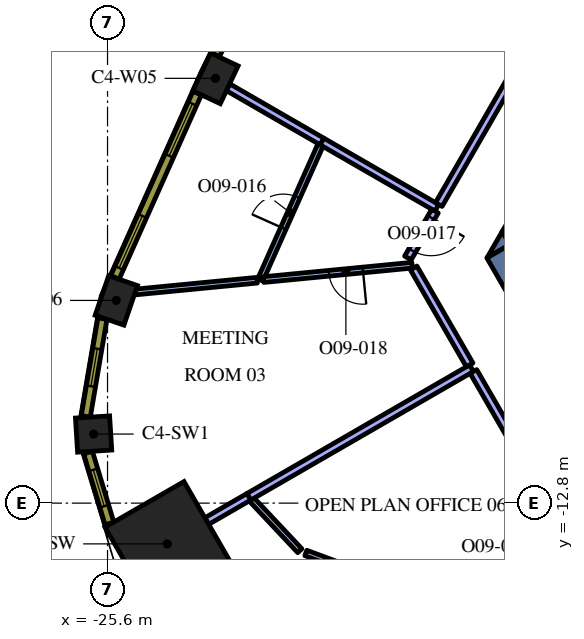
"""IFC4 building model, lengths in metres.
Left out: names, types, materials, properties, quantities, classifications, styles, units other than length and angle.
Written with IfcOpenShell. Run it as: python <this file> out.ifc"""

import sys

from ifc_helpers import new_model, si_unit, direction, frame, frame_2d, origin, origin_2d, place, context, subcontext, project, spatial, polyline, rectangle, outline, extrude, element, fill, save


model = new_model("IFC4")
c1 = context("Model", 3, precision=1e-05, world=origin(), true_north=direction((0.0, 1.0)))
c2 = subcontext(c1, "Body", "Model", "MODEL_VIEW")
j1 = project(units=[si_unit("LENGTHUNIT", "METRE"), si_unit("PLANEANGLEUNIT", "RADIAN")], contexts=[c1])
p1 = place(None, origin())
s1 = spatial("IfcSite", under=j1, at=p1, CompositionType="ELEMENT")
p2 = place(p1, origin())
s2 = spatial("IfcBuilding", under=s1, at=p2, CompositionType="ELEMENT")
p3 = place(p2, frame((0.0, 0.0, 243.6)))
s3 = spatial("IfcBuildingStorey", under=s2, at=p3, CompositionType="ELEMENT", Elevation=243.6)
p4 = place(p3, frame((-24.027, -13.872, 0.0), z_axis=(0.0, 0.0, 1.0), x_axis=(-0.866025403784, -0.5, 0.0)))
e1 = element("IfcColumn", 1, at=p4, inside=s3, PredefinedType="COLUMN", context=c2, shape_type="SweptSolid", body=[
    extrude(rectangle(XDim=2.4, YDim=2.4, at=origin_2d()), origin(), (0.0, 0.0, 1.0), 4.2),
])
for number, where, z_axis, x_axis in (
    (2, (-22.76, -1.623, 0.0), (0.0, 0.0, 1.0), (-0.426, -0.905, 0.0)),
    (3, (-25.369, -7.466, 0.0), (0.0, 0.0, 1.0), (-0.324, -0.946, 0.0)),
):
    element("IfcColumn", number, at=place(p3, frame(where, z_axis=z_axis, x_axis=x_axis)), inside=s3, PredefinedType="COLUMN", context=c2, shape_type="SweptSolid", body=[
        extrude(rectangle(XDim=1.1, YDim=0.8, at=origin_2d()), origin(), (0.0, 0.0, 1.0), 4.2),
    ])
p5 = place(p3, frame((-25.967, -10.982, 0.0), z_axis=(0.0, 0.0, 1.0), x_axis=(0.062217428964, -0.998062619044, 0.0)))
e4 = element("IfcColumn", 4, at=p5, inside=s3, PredefinedType="COLUMN", context=c2, shape_type="SweptSolid", body=[
    extrude(rectangle(XDim=0.9, YDim=0.9, at=origin_2d()), origin(), (0.0, 0.0, 1.0), 4.2),
])
p6 = place(p3, frame((-13.402, -9.487, 0.0), z_axis=(0.0, 0.0, 1.0), x_axis=(-0.500020498207, 0.866013568815, 0.0)))
e5 = element("IfcWall", 5, at=p6, inside=s3, PredefinedType="SOLIDWALL", context=c2, shape_type="SweptSolid", body=[
    extrude(rectangle(XDim=3.829, YDim=0.7, at=frame_2d((1.915, 0.0))), origin(), (0.0, 0.0, 1.0), 4.2),
])
p7 = place(p3, origin())
e6 = element("IfcWall", 6, at=p7, inside=s3, PredefinedType="SOLIDWALL", context=c2, shape_type="SweptSolid", body=[
    extrude(outline(polyline([(-15.014, -5.995), (-15.611, -6.339), (-15.213, -5.65), (-15.014, -5.995)])), origin(), (0.0, 0.0, 1.0), 4.2),
])
p8 = place(p3, frame((-13.475, -3.339, 0.0), z_axis=(0.0, 0.0, 1.0), x_axis=(-0.500008214683, -0.866020660983, 0.0)))
e7 = element("IfcWall", 7, at=p8, inside=s3, PredefinedType="SOLIDWALL", context=c2, shape_type="SweptSolid", body=[
    extrude(rectangle(XDim=2.884, YDim=0.7, at=frame_2d((1.442, 0.0))), origin(), (0.0, 0.0, 1.0), 4.2),
])
e8 = element("IfcWall", 8, at=p7, inside=s3, PredefinedType="SOLIDWALL", context=c2, shape_type="SweptSolid", body=[
    extrude(outline(polyline([(-14.809, -6.35), (-15.197, -5.678), (-14.615, -6.014), (-14.809, -6.35)])), origin(), (0.0, 0.0, 1.0), 4.2),
])
p9 = place(p3, frame((-19.951, -3.288, 0.0), z_axis=(0.0, 0.0, 1.0), x_axis=(-0.866044908516, 0.499966215292, 0.0)))
e9 = element("IfcWall", 9, at=p9, inside=s3, PredefinedType="PARTITIONING", context=c2, shape_type="SweptSolid", body=[
    extrude(rectangle(XDim=2.861, YDim=0.2, at=frame_2d((1.431, 0.0))), origin(), (0.0, 0.0, 1.0), 3.45),
])
p10 = place(p3, frame((-16.934, -5.03, 0.0), z_axis=(0.0, 0.0, 1.0), x_axis=(-0.866031916153, 0.499988720078, 0.0)))
e10 = element("IfcWall", 10, at=p10, inside=s3, PredefinedType="PARTITIONING", context=c2, shape_type="SweptSolid", body=[
    extrude(rectangle(XDim=3.492, YDim=0.2, at=frame_2d((1.746, 0.0))), origin(), (0.0, 0.0, 1.0), 3.45),
])
p11 = place(p3, frame((-14.037, -0.013, 0.0), z_axis=(0.0, 0.0, 1.0), x_axis=(-0.500018205831, -0.866014892388, 0.0)))
e11 = element("IfcWall", 11, at=p11, inside=s3, PredefinedType="PARTITIONING", context=c2, shape_type="SweptSolid", body=[
    extrude(rectangle(XDim=5.693, YDim=0.2, at=frame_2d((2.846, 0.0))), origin(), (0.0, 0.0, 1.0), 3.45),
])
p12 = place(p3, frame((-21.58, -6.927, 0.0), z_axis=(0.0, 0.0, 1.0), x_axis=(0.407612492408, 0.913155001099, 0.0)))
e12 = element("IfcWall", 12, at=p12, inside=s3, PredefinedType="PARTITIONING", context=c2, shape_type="SweptSolid", body=[
    extrude(rectangle(XDim=3.887, YDim=0.15, at=frame_2d((1.943, 0.0))), origin(), (0.0, 0.0, 1.0), 3.45),
])
p13 = place(p12, frame((1.487, 0.0, 0.0)))
e13 = element("IfcOpeningElement", 13, at=p13, cuts=e12, PredefinedType="OPENING", context=c2, shape_type="SweptSolid", body=[
    extrude(rectangle(XDim=0.9, YDim=2.1, at=frame_2d((0.45, 1.05))), frame((0.0, 0.085, 0.0), z_axis=(0.0, -1.0, 0.0), x_axis=(1.0, 0.0, 0.0)), (0.0, 0.0, 1.0), 0.17),
])
p14 = place(p3, frame((-21.666, -6.935, 0.0), z_axis=(0.0, 0.0, 1.0), x_axis=(-0.995359155707, -0.096229679155, 0.0)))
e14 = element("IfcWall", 14, at=p14, inside=s3, PredefinedType="PARTITIONING", context=c2, shape_type="SweptSolid", body=[
    extrude(rectangle(XDim=3.219, YDim=0.15, at=frame_2d((1.61, 0.0))), origin(), (0.0, 0.0, 1.0), 3.45),
])
p15 = place(p3, frame((-17.586, -6.54, 0.0), z_axis=(0.0, 0.0, 1.0), x_axis=(-0.995356357863, -0.096258614479, 0.0)))
e15 = element("IfcWall", 15, at=p15, inside=s3, PredefinedType="PARTITIONING", context=c2, shape_type="SweptSolid", body=[
    extrude(rectangle(XDim=3.926, YDim=0.15, at=frame_2d((1.963, 0.0))), origin(), (0.0, 0.0, 1.0), 3.45),
])
p16 = place(p15, frame((1.3, 0.0, 0.0)))
e16 = element("IfcOpeningElement", 16, at=p16, cuts=e15, PredefinedType="OPENING", context=c2, shape_type="SweptSolid", body=[
    extrude(rectangle(XDim=0.9, YDim=2.1, at=frame_2d((0.45, 1.05))), frame((0.0, 0.085, 0.0), z_axis=(0.0, -1.0, 0.0), x_axis=(1.0, 0.0, 0.0)), (0.0, 0.0, 1.0), 0.17),
])
p17 = place(p3, frame((-16.983, -5.116, 0.0), z_axis=(0.0, 0.0, 1.0), x_axis=(-0.500009219579, -0.866020080793, 0.0)))
e17 = element("IfcWall", 17, at=p17, inside=s3, PredefinedType="PARTITIONING", context=c2, shape_type="SweptSolid", body=[
    extrude(rectangle(XDim=1.425, YDim=0.2, at=frame_2d((0.712, 0.0))), origin(), (0.0, 0.0, 1.0), 3.45),
])
p18 = place(p17, frame((0.2, 0.0, 0.0)))
e18 = element("IfcOpeningElement", 18, at=p18, cuts=e17, PredefinedType="OPENING", context=c2, shape_type="SweptSolid", body=[
    extrude(rectangle(XDim=1.0, YDim=2.1, at=frame_2d((0.5, 1.05))), frame((0.0, 0.11, 0.0), z_axis=(0.0, -1.0, 0.0), x_axis=(1.0, 0.0, 0.0)), (0.0, 0.0, 1.0), 0.22),
])
p19 = place(p3, frame((-21.873, -12.628, 0.0), z_axis=(0.0, 0.0, 1.0), x_axis=(-0.866052988967, -0.499952218018, 0.0)))
e19 = element("IfcWall", 19, at=p19, inside=s3, PredefinedType="PARTITIONING", context=c2, shape_type="SweptSolid", body=[
    extrude(rectangle(XDim=1.288, YDim=0.2, at=frame_2d((0.644, 0.0))), origin(), (0.0, 0.0, 1.0), 3.45),
])
p20 = place(p3, frame((-16.021, -9.25, 0.0), z_axis=(0.0, 0.0, 1.0), x_axis=(-0.86602692059, -0.499997372806, 0.0)))
e20 = element("IfcWall", 20, at=p20, inside=s3, PredefinedType="PARTITIONING", context=c2, shape_type="SweptSolid", body=[
    extrude(rectangle(XDim=6.765, YDim=0.2, at=frame_2d((3.382, 0.0))), origin(), (0.0, 0.0, 1.0), 3.45),
])
p21 = place(p3, frame((-17.545, -6.612, 0.0), z_axis=(0.0, 0.0, 1.0), x_axis=(0.500006981563, -0.86602137294, 0.0)))
e21 = element("IfcWall", 21, at=p21, inside=s3, PredefinedType="PARTITIONING", context=c2, shape_type="SweptSolid", body=[
    extrude(rectangle(XDim=2.946, YDim=0.2, at=frame_2d((1.473, 0.0))), origin(), (0.0, 0.0, 1.0), 3.45),
])
p22 = place(p3, frame((-21.806, -12.705, 0.0), z_axis=(0.0, 0.0, 1.0), x_axis=(0.684700980092, -0.728824099396, 0.0)))
e22 = element("IfcWall", 22, at=p22, inside=s3, PredefinedType="PARTITIONING", context=c2, shape_type="SweptSolid", body=[
    extrude(rectangle(XDim=1.848, YDim=0.15, at=frame_2d((0.924, 0.0))), origin(), (0.0, 0.0, 1.0), 3.45),
])
p23 = place(p3, frame((-20.383, -14.111, 0.0), z_axis=(0.0, 0.0, 1.0), x_axis=(0.937598383102, -0.347720105838, 0.0)))
e23 = element("IfcWall", 23, at=p23, inside=s3, PredefinedType="PARTITIONING", context=c2, shape_type="SweptSolid", body=[
    extrude(rectangle(XDim=2.156, YDim=0.15, at=frame_2d((1.078, 0.0))), origin(), (0.0, 0.0, 1.0), 3.45),
])
p24 = place(p3, frame((-15.971, -9.337, 0.0), z_axis=(0.0, 0.0, 1.0), x_axis=(0.500010870188, -0.866019127788, 0.0)))
e24 = element("IfcWall", 24, at=p24, inside=s3, PredefinedType="PARTITIONING", context=c2, shape_type="SweptSolid", body=[
    extrude(rectangle(XDim=3.249, YDim=0.2, at=frame_2d((1.624, 0.0))), origin(), (0.0, 0.0, 1.0), 3.45),
])
p25 = place(p3, frame((-20.407, 3.74, 0.0), z_axis=(0.0, 0.0, 1.0), x_axis=(-0.445129582031, -0.895466166419, 0.0)))
e25 = element("IfcWall", 25, at=p25, inside=s3, PredefinedType="SOLIDWALL", context=c2, shape_type="SweptSolid", body=[
    extrude(rectangle(XDim=5.298, YDim=0.24, at=frame_2d((2.649, 0.0))), origin(), (0.0, 0.0, 1.0), 3.95),
])
p26 = place(p25, frame((0.295, 0.0, 0.9)))
e26 = element("IfcOpeningElement", 26, at=p26, cuts=e25, PredefinedType="OPENING", context=c2, shape_type="SweptSolid", body=[
    extrude(rectangle(XDim=1.5, YDim=2.55, at=frame_2d((0.75, 1.275))), frame((0.0, 0.13, 0.0), z_axis=(0.0, -1.0, 0.0), x_axis=(1.0, 0.0, 0.0)), (0.0, 0.0, 1.0), 0.26),
])
p27 = place(p25, frame((3.504, 0.0, 0.9)))
e27 = element("IfcOpeningElement", 27, at=p27, cuts=e25, PredefinedType="OPENING", context=c2, shape_type="SweptSolid", body=[
    extrude(rectangle(XDim=1.5, YDim=2.55, at=frame_2d((0.75, 1.275))), frame((0.0, 0.13, 0.0), z_axis=(0.0, -1.0, 0.0), x_axis=(1.0, 0.0, 0.0)), (0.0, 0.0, 1.0), 0.26),
])
p28 = place(p3, frame((-23.24, -2.011, 0.0), z_axis=(0.0, 0.0, 1.0), x_axis=(-0.407579651789, -0.913169659728, 0.0)))
e28 = element("IfcWall", 28, at=p28, inside=s3, PredefinedType="SOLIDWALL", context=c2, shape_type="SweptSolid", body=[
    extrude(rectangle(XDim=5.311, YDim=0.24, at=frame_2d((2.655, 0.0))), origin(), (0.0, 0.0, 1.0), 3.95),
])
p29 = place(p28, frame((0.306, 0.0, 0.9)))
e29 = element("IfcOpeningElement", 29, at=p29, cuts=e28, PredefinedType="OPENING", context=c2, shape_type="SweptSolid", body=[
    extrude(rectangle(XDim=1.5, YDim=2.55, at=frame_2d((0.75, 1.275))), frame((0.0, 0.13, 0.0), z_axis=(0.0, -1.0, 0.0), x_axis=(1.0, 0.0, 0.0)), (0.0, 0.0, 1.0), 0.26),
])
p30 = place(p28, frame((3.539, 0.0, 0.9)))
e30 = element("IfcOpeningElement", 30, at=p30, cuts=e28, PredefinedType="OPENING", context=c2, shape_type="SweptSolid", body=[
    extrude(rectangle(XDim=1.5, YDim=2.55, at=frame_2d((0.75, 1.275))), frame((0.0, 0.13, 0.0), z_axis=(0.0, -1.0, 0.0), x_axis=(1.0, 0.0, 0.0)), (0.0, 0.0, 1.0), 0.26),
])
p31 = place(p3, frame((-25.734, -7.945, 0.0), z_axis=(0.0, 0.0, 1.0), x_axis=(-0.167660055546, -0.985844869021, 0.0)))
e31 = element("IfcWall", 31, at=p31, inside=s3, PredefinedType="SOLIDWALL", context=c2, shape_type="SweptSolid", body=[
    extrude(rectangle(XDim=2.609, YDim=0.24, at=frame_2d((1.305, 0.0))), origin(), (0.0, 0.0, 1.0), 3.95),
])
p32 = place(p31, frame((0.805, 0.0, 0.9)))
e32 = element("IfcOpeningElement", 32, at=p32, cuts=e31, PredefinedType="OPENING", context=c2, shape_type="SweptSolid", body=[
    extrude(rectangle(XDim=1.0, YDim=2.55, at=frame_2d((0.5, 1.275))), frame((0.0, 0.13, 0.0), z_axis=(0.0, -1.0, 0.0), x_axis=(1.0, 0.0, 0.0)), (0.0, 0.0, 1.0), 0.26),
])
p33 = place(p3, frame((-26.112, -11.469, 0.0), z_axis=(0.0, 0.0, 1.0), x_axis=(0.288727209095, -0.957411405159, 0.0)))
e33 = element("IfcWall", 33, at=p33, inside=s3, PredefinedType="SOLIDWALL", context=c2, shape_type="SweptSolid", body=[
    extrude(rectangle(XDim=1.948, YDim=0.24, at=frame_2d((0.974, 0.0))), origin(), (0.0, 0.0, 1.0), 3.95),
])
p34 = place(p33, frame((0.474, 0.0, 0.9)))
e34 = element("IfcOpeningElement", 34, at=p34, cuts=e33, PredefinedType="OPENING", context=c2, shape_type="SweptSolid", body=[
    extrude(rectangle(XDim=1.0, YDim=2.55, at=frame_2d((0.5, 1.275))), frame((0.0, 0.13, 0.0), z_axis=(0.0, -1.0, 0.0), x_axis=(1.0, 0.0, 0.0)), (0.0, 0.0, 1.0), 0.26),
])
p35 = place(p13, origin())
e35 = element("IfcDoor", 35, at=p35, inside=s3, OperationType="SINGLE_SWING_LEFT", PredefinedType="DOOR", context=c2, shape_type="SweptSolid", body=[
    extrude(rectangle(XDim=0.9, YDim=2.1, at=frame_2d((0.45, 1.05))), frame((0.0, 0.025, 0.0), z_axis=(0.0, -1.0, 0.0), x_axis=(1.0, 0.0, 0.0)), (0.0, 0.0, 1.0), 0.05),
])
fill(e13, e35)
p36 = place(p18, origin())
e36 = element("IfcDoor", 36, at=p36, inside=s3, OperationType="SINGLE_SWING_LEFT", PredefinedType="DOOR", context=c2, shape_type="SweptSolid", body=[
    extrude(rectangle(XDim=1.0, YDim=2.1, at=frame_2d((0.5, 1.05))), frame((0.0, 0.025, 0.0), z_axis=(0.0, -1.0, 0.0), x_axis=(1.0, 0.0, 0.0)), (0.0, 0.0, 1.0), 0.05),
])
fill(e18, e36)
p37 = place(p16, origin())
e37 = element("IfcDoor", 37, at=p37, inside=s3, OperationType="SINGLE_SWING_LEFT", PredefinedType="DOOR", context=c2, shape_type="SweptSolid", body=[
    extrude(rectangle(XDim=0.9, YDim=2.1, at=frame_2d((0.45, 1.05))), frame((0.0, 0.025, 0.0), z_axis=(0.0, -1.0, 0.0), x_axis=(1.0, 0.0, 0.0)), (0.0, 0.0, 1.0), 0.05),
])
fill(e16, e37)
p38 = place(p29, origin())
e38 = element("IfcWindow", 38, at=p38, inside=s3, PartitioningType="SINGLE_PANEL", PredefinedType="WINDOW", context=c2, shape_type="SweptSolid", body=[
    extrude(rectangle(XDim=1.5, YDim=2.55, at=frame_2d((0.75, 1.275))), frame((0.0, 0.04, 0.0), z_axis=(0.0, -1.0, 0.0), x_axis=(1.0, 0.0, 0.0)), (0.0, 0.0, 1.0), 0.06),
])
fill(e29, e38)
p39 = place(p30, origin())
e39 = element("IfcWindow", 39, at=p39, inside=s3, PartitioningType="SINGLE_PANEL", PredefinedType="WINDOW", context=c2, shape_type="SweptSolid", body=[
    extrude(rectangle(XDim=1.5, YDim=2.55, at=frame_2d((0.75, 1.275))), frame((0.0, 0.04, 0.0), z_axis=(0.0, -1.0, 0.0), x_axis=(1.0, 0.0, 0.0)), (0.0, 0.0, 1.0), 0.06),
])
fill(e30, e39)
p40 = place(p32, origin())
e40 = element("IfcWindow", 40, at=p40, inside=s3, PartitioningType="SINGLE_PANEL", PredefinedType="WINDOW", context=c2, shape_type="SweptSolid", body=[
    extrude(rectangle(XDim=1.0, YDim=2.55, at=frame_2d((0.5, 1.275))), frame((0.0, 0.04, 0.0), z_axis=(0.0, -1.0, 0.0), x_axis=(1.0, 0.0, 0.0)), (0.0, 0.0, 1.0), 0.06),
])
fill(e32, e40)
p41 = place(p34, origin())
e41 = element("IfcWindow", 41, at=p41, inside=s3, PartitioningType="SINGLE_PANEL", PredefinedType="WINDOW", context=c2, shape_type="SweptSolid", body=[
    extrude(rectangle(XDim=1.0, YDim=2.55, at=frame_2d((0.5, 1.275))), frame((0.0, 0.04, 0.0), z_axis=(0.0, -1.0, 0.0), x_axis=(1.0, 0.0, 0.0)), (0.0, 0.0, 1.0), 0.06),
])
fill(e34, e41)
save(model, sys.argv[1])
